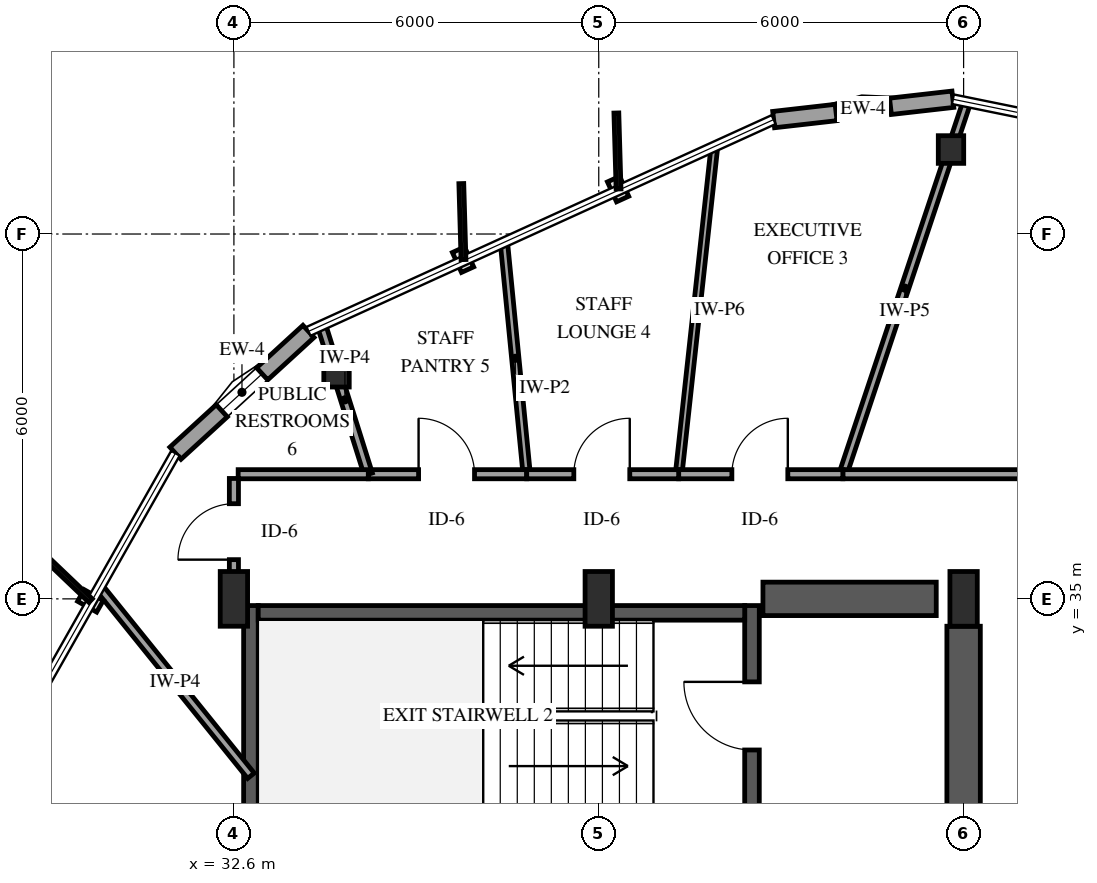
"""IFC4 building model, lengths in metres.
Left out: names, types, materials, properties, quantities, classifications, styles, units other than length and angle.
Written with IfcOpenShell. Run it as: python <this file> out.ifc"""

import sys

from ifc_helpers import new_model, si_unit, direction, frame, frame_2d, origin, origin_2d, place, context, subcontext, project, spatial, rectangle, i_section, extrude, element, fill, save


model = new_model("IFC4")
c1 = context("Model", 3, precision=1e-05, world=origin(), true_north=direction((0.0, 1.0)))
c2 = subcontext(c1, "Body", "Model", "MODEL_VIEW")
j1 = project(units=[si_unit("LENGTHUNIT", "METRE"), si_unit("PLANEANGLEUNIT", "RADIAN")], contexts=[c1])
p1 = place(None, origin())
s1 = spatial("IfcSite", under=j1, at=p1, CompositionType="ELEMENT")
p2 = place(p1, origin())
s2 = spatial("IfcBuilding", under=s1, at=p2, CompositionType="ELEMENT")
p3 = place(p2, frame((0.0, 0.0, 122.5)))
s3 = spatial("IfcBuildingStorey", under=s2, at=p3, CompositionType="ELEMENT", Elevation=122.5)
p4 = place(p3, frame((32.88, 31.26, 0.0), z_axis=(0.0, 0.0, 1.0), x_axis=(0.0, 1.0, 0.0)))
e1 = element("IfcWall", 1, at=p4, inside=s3, PredefinedType="SHEAR", context=c2, shape_type="SweptSolid", body=[
    extrude(rectangle(XDim=3.63, YDim=0.24, at=frame_2d((1.815, 0.0))), origin(), (0.0, 0.0, 1.0), 3.9),
])
p5 = place(p3, frame((41.12, 31.26, 0.0), z_axis=(0.0, 0.0, 1.0), x_axis=(0.0, 1.0, 0.0)))
e2 = element("IfcWall", 2, at=p5, inside=s3, PredefinedType="SHEAR", context=c2, shape_type="SweptSolid", body=[
    extrude(rectangle(XDim=3.63, YDim=0.24, at=frame_2d((1.815, 0.0))), origin(), (0.0, 0.0, 1.0), 3.9),
])
p6 = place(p5, frame((1.255, 0.0, 0.0)))
e3 = element("IfcOpeningElement", 3, at=p6, cuts=e2, PredefinedType="OPENING", context=c2, shape_type="SweptSolid", body=[
    extrude(rectangle(XDim=1.12, YDim=2.15, at=frame_2d((0.56, 1.075))), frame((0.0, 0.13, 0.0), z_axis=(0.0, -1.0, 0.0), x_axis=(1.0, 0.0, 0.0)), (0.0, 0.0, 1.0), 0.26),
])
p7 = place(p3, frame((33.0, 34.77, 0.0), z_axis=(0.0, 0.0, 1.0), x_axis=(1.0, 0.0, 0.0)))
e4 = element("IfcWall", 4, at=p7, inside=s3, PredefinedType="SHEAR", context=c2, shape_type="SweptSolid", body=[
    extrude(rectangle(XDim=8.0, YDim=0.24, at=frame_2d((4.0, 0.0))), origin(), (0.0, 0.0, 1.0), 3.9),
])
p8 = place(p3, frame((41.3, 35.0, 0.0), z_axis=(0.0, 0.0, 1.0), x_axis=(1.0, 0.0, 0.0)))
e5 = element("IfcWall", 5, at=p8, inside=s3, PredefinedType="SHEAR", context=c2, shape_type="SweptSolid", body=[
    extrude(rectangle(XDim=2.85, YDim=0.55, at=frame_2d((1.425, 0.0))), origin(), (0.0, 0.0, 1.0), 3.9),
])
p9 = place(p3, frame((44.6, 29.8, 0.0), z_axis=(0.0, 0.0, 1.0), x_axis=(0.0, 1.0, 0.0)))
e6 = element("IfcWall", 6, at=p9, inside=s3, PredefinedType="SHEAR", context=c2, shape_type="SweptSolid", body=[
    extrude(rectangle(XDim=4.75, YDim=0.55, at=frame_2d((2.375, 0.0))), origin(), (0.0, 0.0, 1.0), 3.9),
])
for number, where, z_axis, x_axis in (
    (7, (32.6, 35.0, 0.0), (0.0, 0.0, 1.0), (1.0, 0.0, 0.0)),
    (8, (38.6, 35.0, 0.0), (0.0, 0.0, 1.0), (1.0, 0.0, 0.0)),
    (9, (44.6, 35.0, 0.0), (0.0, 0.0, 1.0), (1.0, 0.0, 0.0)),
):
    element("IfcColumn", number, at=place(p3, frame(where, z_axis=z_axis, x_axis=x_axis)), inside=s3, PredefinedType="PILASTER", context=c2, shape_type="SweptSolid", body=[
        extrude(rectangle(XDim=0.45, YDim=0.9, at=origin_2d()), origin(), (0.0, 0.0, 1.0), 3.9),
    ])
for number, where, z_axis, x_axis in (
    (10, (44.393, 42.389, 0.0), (0.0, 0.0, 1.0), (1.0, 0.0, 0.0)),
    (11, (34.288, 38.711, 0.0), (0.0, 0.0, 1.0), (1.0, 0.0, 0.0)),
):
    element("IfcColumn", number, at=place(p3, frame(where, z_axis=z_axis, x_axis=x_axis)), inside=s3, PredefinedType="COLUMN", context=c2, shape_type="SweptSolid", body=[
        extrude(i_section(OverallWidth=0.418, OverallDepth=0.455, WebThickness=0.042, FlangeThickness=0.068, FilletRadius=0.038, at=origin_2d()), origin(), (0.0, 0.0, 1.0), 3.9),
    ])
p10 = place(p3, frame((44.424, 43.217, 0.0), z_axis=(0.0, 0.0, 1.0), x_axis=(-0.993605674431, -0.11290599514, 0.0)))
e12 = element("IfcWall", 12, at=p10, inside=s3, PredefinedType="SOLIDWALL", context=c2, shape_type="SweptSolid", body=[
    extrude(rectangle(XDim=2.967, YDim=0.27, at=frame_2d((1.483, 0.0))), origin(), (0.0, 0.0, 1.0), 2.979),
])
p11 = place(p10, frame((1.033, 0.0, 0.75)))
e13 = element("IfcOpeningElement", 13, at=p11, cuts=e12, PredefinedType="OPENING", context=c2, shape_type="SweptSolid", body=[
    extrude(rectangle(XDim=0.9, YDim=1.5, at=frame_2d((0.45, 0.75))), frame((0.0, 0.145, 0.0), z_axis=(0.0, -1.0, 0.0), x_axis=(1.0, 0.0, 0.0)), (0.0, 0.0, 1.0), 0.29),
])
p12 = place(p3, frame((33.826, 39.399, 0.0), z_axis=(0.0, 0.0, 1.0), x_axis=(-0.737529789318, -0.675314600663, 0.0)))
e14 = element("IfcWall", 14, at=p12, inside=s3, PredefinedType="SOLIDWALL", context=c2, shape_type="SweptSolid", body=[
    extrude(rectangle(XDim=2.967, YDim=0.27, at=frame_2d((1.483, 0.0))), origin(), (0.0, 0.0, 1.0), 2.979),
])
p13 = place(p12, frame((1.033, 0.0, 0.75)))
e15 = element("IfcOpeningElement", 15, at=p13, cuts=e14, PredefinedType="OPENING", context=c2, shape_type="SweptSolid", body=[
    extrude(rectangle(XDim=0.9, YDim=1.5, at=frame_2d((0.45, 0.75))), frame((0.0, 0.145, 0.0), z_axis=(0.0, -1.0, 0.0), x_axis=(1.0, 0.0, 0.0)), (0.0, 0.0, 1.0), 0.29),
])
p14 = place(p3, frame((42.614, 37.05, 0.0), z_axis=(0.0, 0.0, 1.0), x_axis=(0.31610286631, 0.948724922151, 0.0)))
e16 = element("IfcWall", 16, at=p14, inside=s3, PredefinedType="PARTITIONING", context=c2, shape_type="SweptSolid", body=[
    extrude(rectangle(XDim=6.451, YDim=0.13, at=frame_2d((3.225, 0.0))), origin(), (0.0, 0.0, 1.0), 2.895),
])
p15 = place(p3, frame((39.914, 37.05, 0.0), z_axis=(0.0, 0.0, 1.0), x_axis=(0.108468553753, 0.99409988072, 0.0)))
e17 = element("IfcWall", 17, at=p15, inside=s3, PredefinedType="PARTITIONING", context=c2, shape_type="SweptSolid", body=[
    extrude(rectangle(XDim=5.42, YDim=0.11, at=frame_2d((2.71, 0.0))), origin(), (0.0, 0.0, 1.0), 3.6),
])
p16 = place(p3, frame((32.88, 32.091, 0.0), z_axis=(0.0, 0.0, 1.0), x_axis=(-0.627800500923, 0.778374287243, 0.0)))
e18 = element("IfcWall", 18, at=p16, inside=s3, PredefinedType="PARTITIONING", context=c2, shape_type="SweptSolid", body=[
    extrude(rectangle(XDim=3.972, YDim=0.14, at=frame_2d((1.986, 0.0))), origin(), (0.0, 0.0, 1.0), 3.6),
])
p17 = place(p3, frame((42.614, 37.05, 0.0), z_axis=(0.0, 0.0, 1.0), x_axis=(1.0, 0.0, 0.0)))
e19 = element("IfcWall", 19, at=p17, inside=s3, PredefinedType="PARTITIONING", context=c2, shape_type="SweptSolid", body=[
    extrude(rectangle(XDim=3.966, YDim=0.15, at=frame_2d((1.983, 0.0))), origin(), (0.0, 0.0, 1.0), 3.6),
])
p18 = place(p3, frame((37.415, 37.05, 0.0), z_axis=(0.0, 0.0, 1.0), x_axis=(-0.097900688279, 0.995196189319, 0.0)))
e20 = element("IfcWall", 20, at=p18, inside=s3, PredefinedType="PARTITIONING", context=c2, shape_type="SweptSolid", body=[
    extrude(rectangle(XDim=3.83, YDim=0.12, at=frame_2d((1.915, 0.0))), origin(), (0.0, 0.0, 1.0), 3.6),
])
p19 = place(p3, frame((39.914, 37.05, 0.0), z_axis=(0.0, 0.0, 1.0), x_axis=(1.0, 0.0, 0.0)))
e21 = element("IfcWall", 21, at=p19, inside=s3, PredefinedType="PARTITIONING", context=c2, shape_type="SweptSolid", body=[
    extrude(rectangle(XDim=2.7, YDim=0.15, at=frame_2d((1.35, 0.0))), origin(), (0.0, 0.0, 1.0), 3.6),
])
p20 = place(p19, frame((0.875, 0.0, 0.0)))
e22 = element("IfcOpeningElement", 22, at=p20, cuts=e21, PredefinedType="OPENING", context=c2, shape_type="SweptSolid", body=[
    extrude(rectangle(XDim=0.92, YDim=2.12, at=frame_2d((0.46, 1.06))), frame((0.0, 0.085, 0.0), z_axis=(0.0, -1.0, 0.0), x_axis=(1.0, 0.0, 0.0)), (0.0, 0.0, 1.0), 0.17),
])
p21 = place(p3, frame((34.81, 37.05, 0.0), z_axis=(0.0, 0.0, 1.0), x_axis=(1.0, 0.0, 0.0)))
e23 = element("IfcWall", 23, at=p21, inside=s3, PredefinedType="PARTITIONING", context=c2, shape_type="SweptSolid", body=[
    extrude(rectangle(XDim=2.605, YDim=0.15, at=frame_2d((1.302, 0.0))), origin(), (0.0, 0.0, 1.0), 3.6),
])
p22 = place(p21, frame((0.827, 0.0, 0.0)))
e24 = element("IfcOpeningElement", 24, at=p22, cuts=e23, PredefinedType="OPENING", context=c2, shape_type="SweptSolid", body=[
    extrude(rectangle(XDim=0.92, YDim=2.12, at=frame_2d((0.46, 1.06))), frame((0.0, 0.085, 0.0), z_axis=(0.0, -1.0, 0.0), x_axis=(1.0, 0.0, 0.0)), (0.0, 0.0, 1.0), 0.17),
])
p23 = place(p3, frame((34.81, 37.05, 0.0), z_axis=(0.0, 0.0, 1.0), x_axis=(-0.299928106124, 0.953961808018, 0.0)))
e25 = element("IfcWall", 25, at=p23, inside=s3, PredefinedType="PARTITIONING", context=c2, shape_type="SweptSolid", body=[
    extrude(rectangle(XDim=2.564, YDim=0.14, at=frame_2d((1.282, 0.0))), origin(), (0.0, 0.0, 1.0), 2.895),
])
p24 = place(p3, frame((37.415, 37.05, 0.0), z_axis=(0.0, 0.0, 1.0), x_axis=(1.0, 0.0, 0.0)))
e26 = element("IfcWall", 26, at=p24, inside=s3, PredefinedType="PARTITIONING", context=c2, shape_type="SweptSolid", body=[
    extrude(rectangle(XDim=2.499, YDim=0.15, at=frame_2d((1.25, 0.0))), origin(), (0.0, 0.0, 1.0), 3.6),
])
p25 = place(p24, frame((0.775, 0.0, 0.0)))
e27 = element("IfcOpeningElement", 27, at=p25, cuts=e26, PredefinedType="OPENING", context=c2, shape_type="SweptSolid", body=[
    extrude(rectangle(XDim=0.92, YDim=2.12, at=frame_2d((0.46, 1.06))), frame((0.0, 0.085, 0.0), z_axis=(0.0, -1.0, 0.0), x_axis=(1.0, 0.0, 0.0)), (0.0, 0.0, 1.0), 0.17),
])
p26 = place(p3, frame((32.67, 37.05, 0.0), z_axis=(0.0, 0.0, 1.0), x_axis=(1.0, 0.0, 0.0)))
e28 = element("IfcWall", 28, at=p26, inside=s3, PredefinedType="PARTITIONING", context=c2, shape_type="SweptSolid", body=[
    extrude(rectangle(XDim=2.14, YDim=0.15, at=frame_2d((1.07, 0.0))), origin(), (0.0, 0.0, 1.0), 3.6),
])
p27 = place(p3, frame((32.6, 35.07, 0.0), z_axis=(0.0, 0.0, 1.0), x_axis=(0.0, 1.0, 0.0)))
e29 = element("IfcWall", 29, at=p27, inside=s3, PredefinedType="PARTITIONING", context=c2, shape_type="SweptSolid", body=[
    extrude(rectangle(XDim=1.91, YDim=0.15, at=frame_2d((0.955, 0.0))), origin(), (0.0, 0.0, 1.0), 3.6),
])
p28 = place(p27, frame((0.575, 0.0, 0.0)))
e30 = element("IfcOpeningElement", 30, at=p28, cuts=e29, PredefinedType="OPENING", context=c2, shape_type="SweptSolid", body=[
    extrude(rectangle(XDim=0.92, YDim=2.12, at=frame_2d((0.46, 1.06))), frame((0.0, 0.085, 0.0), z_axis=(0.0, -1.0, 0.0), x_axis=(1.0, 0.0, 0.0)), (0.0, 0.0, 1.0), 0.17),
])
p29 = place(p11, origin())
e31 = element("IfcWindow", 31, at=p29, inside=s3, PartitioningType="SINGLE_PANEL", PredefinedType="WINDOW", context=c2, shape_type="SweptSolid", body=[
    extrude(rectangle(XDim=0.9, YDim=1.5, at=frame_2d((0.45, 0.75))), frame((0.0, 0.03, 0.0), z_axis=(0.0, -1.0, 0.0), x_axis=(1.0, 0.0, 0.0)), (0.0, 0.0, 1.0), 0.06),
])
fill(e13, e31)
p30 = place(p13, origin())
e32 = element("IfcWindow", 32, at=p30, inside=s3, PartitioningType="SINGLE_PANEL", PredefinedType="WINDOW", context=c2, shape_type="SweptSolid", body=[
    extrude(rectangle(XDim=0.9, YDim=1.5, at=frame_2d((0.45, 0.75))), frame((0.0, 0.03, 0.0), z_axis=(0.0, -1.0, 0.0), x_axis=(1.0, 0.0, 0.0)), (0.0, 0.0, 1.0), 0.06),
])
fill(e15, e32)
p31 = place(p6, origin())
e33 = element("IfcDoor", 33, at=p31, inside=s3, OperationType="SINGLE_SWING_RIGHT", PredefinedType="DOOR", context=c2, shape_type="SweptSolid", body=[
    extrude(rectangle(XDim=1.12, YDim=2.15, at=frame_2d((0.56, 1.075))), frame((0.0, 0.025, 0.0), z_axis=(0.0, -1.0, 0.0), x_axis=(1.0, 0.0, 0.0)), (0.0, 0.0, 1.0), 0.05),
])
fill(e3, e33)
p32 = place(p20, origin())
e34 = element("IfcDoor", 34, at=p32, inside=s3, OperationType="SINGLE_SWING_RIGHT", PredefinedType="DOOR", context=c2, shape_type="SweptSolid", body=[
    extrude(rectangle(XDim=0.92, YDim=2.12, at=frame_2d((0.46, 1.06))), frame((0.0, 0.025, 0.0), z_axis=(0.0, -1.0, 0.0), x_axis=(1.0, 0.0, 0.0)), (0.0, 0.0, 1.0), 0.05),
])
fill(e22, e34)
p33 = place(p22, origin())
e35 = element("IfcDoor", 35, at=p33, inside=s3, OperationType="SINGLE_SWING_LEFT", PredefinedType="DOOR", context=c2, shape_type="SweptSolid", body=[
    extrude(rectangle(XDim=0.92, YDim=2.12, at=frame_2d((0.46, 1.06))), frame((0.0, 0.025, 0.0), z_axis=(0.0, -1.0, 0.0), x_axis=(1.0, 0.0, 0.0)), (0.0, 0.0, 1.0), 0.05),
])
fill(e24, e35)
p34 = place(p25, origin())
e36 = element("IfcDoor", 36, at=p34, inside=s3, OperationType="SINGLE_SWING_RIGHT", PredefinedType="DOOR", context=c2, shape_type="SweptSolid", body=[
    extrude(rectangle(XDim=0.92, YDim=2.12, at=frame_2d((0.46, 1.06))), frame((0.0, 0.025, 0.0), z_axis=(0.0, -1.0, 0.0), x_axis=(1.0, 0.0, 0.0)), (0.0, 0.0, 1.0), 0.05),
])
fill(e27, e36)
p35 = place(p28, origin())
e37 = element("IfcDoor", 37, at=p35, inside=s3, OperationType="SINGLE_SWING_LEFT", PredefinedType="DOOR", context=c2, shape_type="SweptSolid", body=[
    extrude(rectangle(XDim=0.92, YDim=2.12, at=frame_2d((0.46, 1.06))), frame((0.0, 0.025, 0.0), z_axis=(0.0, -1.0, 0.0), x_axis=(1.0, 0.0, 0.0)), (0.0, 0.0, 1.0), 0.05),
])
fill(e30, e37)
save(model, sys.argv[1])
